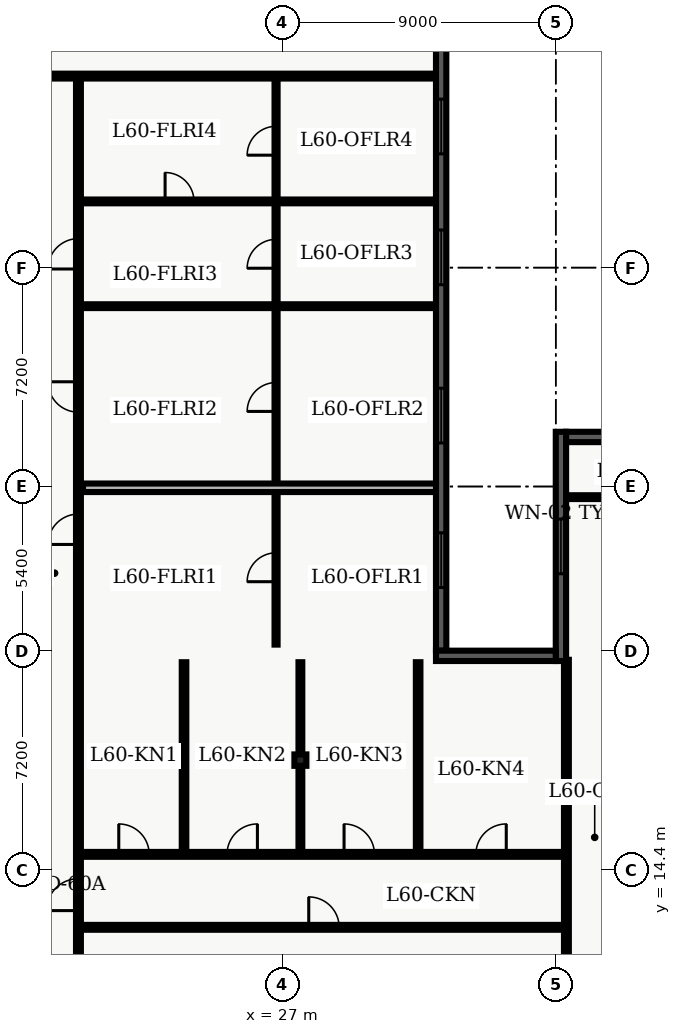
"""IFC4 building model, lengths in metres.
Left out: names, types, materials, properties, quantities, classifications, styles, units other than length and angle.
Written with IfcOpenShell. Run it as: python <this file> out.ifc"""

import sys

from ifc_helpers import new_model, entity, si_unit, converted_unit, direction, frame, origin_with_axes, origin_2d_with_axis, place, context, subcontext, project, spatial, polyline, rectangle, i_section, outline, extrude, element, fill, save


model = new_model("IFC4")
c1 = context("Model", 3, precision=1e-05, world=origin_with_axes(), true_north=direction((0.0, 1.0)))
c2 = subcontext(c1, "Body", "Model", "MODEL_VIEW")
j1 = project(units=[si_unit("LENGTHUNIT", "METRE"), converted_unit("PLANEANGLEUNIT", "DEGREE", entity("IfcPlaneAngleMeasure", 0.017), si_unit("PLANEANGLEUNIT", "RADIAN"), dimensions=[0, 0, 0, 0, 0, 0, 0])], contexts=[c1])
p1 = place(None, origin_with_axes())
s1 = spatial("IfcSite", under=j1, at=p1, CompositionType="ELEMENT")
p2 = place(p1, origin_with_axes())
s2 = spatial("IfcBuilding", under=s1, at=p2, CompositionType="ELEMENT")
p3 = place(p2, frame((0.0, 0.0, 244.2), z_axis=(0.0, 0.0, 1.0), x_axis=(1.0, 0.0, 0.0)))
s3 = spatial("IfcBuildingStorey", under=s2, at=p3, CompositionType="ELEMENT", Elevation=244.2)
p4 = place(p3, frame((27.6, 18.0, 0.0), z_axis=(0.0, 0.0, 1.0), x_axis=(1.0, 0.0, 0.0)))
e1 = element("IfcColumn", 1, at=p4, inside=s3, PredefinedType="COLUMN", context=c2, shape_type="SweptSolid", body=[
    extrude(i_section(OverallWidth=0.394, OverallDepth=0.375, WebThickness=0.017, FlangeThickness=0.028, FilletRadius=0.02, at=origin_2d_with_axis()), origin_with_axes(), (0.0, 0.0, 1.0), 3.9),
])
p5 = place(p3, frame((7.1, 40.5, 0.0), z_axis=(0.0, 0.0, 1.0), x_axis=(1.0, 0.0, 0.0)))
e2 = element("IfcWall", 2, at=p5, inside=s3, PredefinedType="PARTITIONING", context=c2, shape_type="SweptSolid", body=[
    extrude(outline(polyline([(0.0, -0.08), (24.965, -0.08), (24.965, 0.08), (0.0, 0.08), (0.0, -0.08)])), origin_with_axes(), (0.0, 0.0, 1.0), 2.64),
])
p6 = place(p5, frame((4.38, 0.0, 0.0), z_axis=(0.0, 0.0, 1.0), x_axis=(1.0, 0.0, 0.0)))
e3 = element("IfcOpeningElement", 3, at=p6, cuts=e2, PredefinedType="OPENING", context=c2, shape_type="SweptSolid", body=[
    extrude(rectangle(XDim=1.0, YDim=0.18, at=origin_2d_with_axis()), origin_with_axes(), (0.0, 0.0, 1.0), 2.15),
])
p7 = place(p5, frame((7.566, 0.0, 0.0), z_axis=(0.0, 0.0, 1.0), x_axis=(1.0, 0.0, 0.0)))
e4 = element("IfcOpeningElement", 4, at=p7, cuts=e2, PredefinedType="OPENING", context=c2, shape_type="SweptSolid", body=[
    extrude(rectangle(XDim=1.0, YDim=0.18, at=origin_2d_with_axis()), origin_with_axes(), (0.0, 0.0, 1.0), 2.15),
])
p8 = place(p5, frame((11.129, 0.0, 0.0), z_axis=(0.0, 0.0, 1.0), x_axis=(1.0, 0.0, 0.0)))
e5 = element("IfcOpeningElement", 5, at=p8, cuts=e2, PredefinedType="OPENING", context=c2, shape_type="SweptSolid", body=[
    extrude(rectangle(XDim=1.0, YDim=0.18, at=origin_2d_with_axis()), origin_with_axes(), (0.0, 0.0, 1.0), 2.15),
])
p9 = place(p3, frame((20.3, 7.8, 0.0), z_axis=(0.0, 0.0, 1.0), x_axis=(0.0, 1.0, 0.0)))
e6 = element("IfcWall", 6, at=p9, inside=s3, PredefinedType="PARTITIONING", context=c2, shape_type="SweptSolid", body=[
    extrude(outline(polyline([(0.0, -0.08), (32.7, -0.08), (32.7, 0.08), (0.0, 0.08), (0.0, -0.08)])), origin_with_axes(), (0.0, 0.0, 1.0), 2.64),
])
p10 = place(p9, frame((17.794, 0.0, 0.0), z_axis=(0.0, 0.0, 1.0), x_axis=(1.0, 0.0, 0.0)))
e7 = element("IfcOpeningElement", 7, at=p10, cuts=e6, PredefinedType="OPENING", context=c2, shape_type="SweptSolid", body=[
    extrude(rectangle(XDim=1.0, YDim=0.18, at=origin_2d_with_axis()), origin_with_axes(), (0.0, 0.0, 1.0), 2.15),
])
p11 = place(p9, frame((22.145, 0.0, 0.0), z_axis=(0.0, 0.0, 1.0), x_axis=(1.0, 0.0, 0.0)))
e8 = element("IfcOpeningElement", 8, at=p11, cuts=e6, PredefinedType="OPENING", context=c2, shape_type="SweptSolid", body=[
    extrude(rectangle(XDim=1.0, YDim=0.18, at=origin_2d_with_axis()), origin_with_axes(), (0.0, 0.0, 1.0), 2.15),
])
p12 = place(p9, frame((26.855, 0.0, 0.0), z_axis=(0.0, 0.0, 1.0), x_axis=(1.0, 0.0, 0.0)))
e9 = element("IfcOpeningElement", 9, at=p12, cuts=e6, PredefinedType="OPENING", context=c2, shape_type="SweptSolid", body=[
    extrude(rectangle(XDim=1.0, YDim=0.18, at=origin_2d_with_axis()), origin_with_axes(), (0.0, 0.0, 1.0), 2.15),
])
p13 = place(p9, frame((5.775, 0.0, 0.0), z_axis=(0.0, 0.0, 1.0), x_axis=(1.0, 0.0, 0.0)))
e10 = element("IfcOpeningElement", 10, at=p13, cuts=e6, PredefinedType="OPENING", context=c2, shape_type="SweptSolid", body=[
    extrude(rectangle(XDim=1.05, YDim=0.18, at=origin_2d_with_axis()), origin_with_axes(), (0.0, 0.0, 1.0), 2.15),
])
p14 = place(p3, frame((26.8, 21.8, 0.0), z_axis=(0.0, 0.0, 1.0), x_axis=(0.0, 1.0, 0.0)))
e11 = element("IfcWall", 11, at=p14, inside=s3, PredefinedType="PARTITIONING", context=c2, shape_type="SweptSolid", body=[
    extrude(outline(polyline([(0.0, -0.05), (18.5, -0.05), (18.5, 0.05), (0.0, 0.05), (0.0, -0.05)])), origin_with_axes(), (0.0, 0.0, 1.0), 2.64),
])
p15 = place(p14, frame((2.544, 0.0, 0.0), z_axis=(0.0, 0.0, 1.0), x_axis=(1.0, 0.0, 0.0)))
e12 = element("IfcOpeningElement", 12, at=p15, cuts=e11, PredefinedType="OPENING", context=c2, shape_type="SweptSolid", body=[
    extrude(rectangle(XDim=0.95, YDim=0.12, at=origin_2d_with_axis()), origin_with_axes(), (0.0, 0.0, 1.0), 2.15),
])
p16 = place(p14, frame((8.145, 0.0, 0.0), z_axis=(0.0, 0.0, 1.0), x_axis=(1.0, 0.0, 0.0)))
e13 = element("IfcOpeningElement", 13, at=p16, cuts=e11, PredefinedType="OPENING", context=c2, shape_type="SweptSolid", body=[
    extrude(rectangle(XDim=0.95, YDim=0.12, at=origin_2d_with_axis()), origin_with_axes(), (0.0, 0.0, 1.0), 2.15),
])
p17 = place(p14, frame((12.855, 0.0, 0.0), z_axis=(0.0, 0.0, 1.0), x_axis=(1.0, 0.0, 0.0)))
e14 = element("IfcOpeningElement", 14, at=p17, cuts=e11, PredefinedType="OPENING", context=c2, shape_type="SweptSolid", body=[
    extrude(rectangle(XDim=0.95, YDim=0.12, at=origin_2d_with_axis()), origin_with_axes(), (0.0, 0.0, 1.0), 2.15),
])
p18 = place(p14, frame((16.574, 0.0, 0.0), z_axis=(0.0, 0.0, 1.0), x_axis=(1.0, 0.0, 0.0)))
e15 = element("IfcOpeningElement", 15, at=p18, cuts=e11, PredefinedType="OPENING", context=c2, shape_type="SweptSolid", body=[
    extrude(rectangle(XDim=0.95, YDim=0.12, at=origin_2d_with_axis()), origin_with_axes(), (0.0, 0.0, 1.0), 2.15),
])
p19 = place(p3, frame((20.45, 26.958, 0.0), z_axis=(0.0, 0.0, 1.0), x_axis=(1.0, 0.0, 0.0)))
e16 = element("IfcWall", 16, at=p19, inside=s3, PredefinedType="PARTITIONING", context=c2, shape_type="SweptSolid", body=[
    extrude(outline(polyline([(0.0, -0.14), (11.615, -0.14), (11.615, 0.14), (0.0, 0.14), (0.0, -0.14)])), origin_with_axes(), (0.0, 0.0, 1.0), 2.64),
])
p20 = place(p3, frame((20.45, 32.932, 0.0), z_axis=(0.0, 0.0, 1.0), x_axis=(1.0, 0.0, 0.0)))
e17 = element("IfcWall", 17, at=p20, inside=s3, PredefinedType="PARTITIONING", context=c2, shape_type="SweptSolid", body=[
    extrude(outline(polyline([(0.0, -0.062), (11.615, -0.062), (11.615, 0.062), (0.0, 0.062), (0.0, -0.062)])), origin_with_axes(), (0.0, 0.0, 1.0), 2.64),
])
p21 = place(p3, frame((20.45, 36.378, 0.0), z_axis=(0.0, 0.0, 1.0), x_axis=(1.0, 0.0, 0.0)))
e18 = element("IfcWall", 18, at=p21, inside=s3, PredefinedType="PARTITIONING", context=c2, shape_type="SweptSolid", body=[
    extrude(outline(polyline([(0.0, -0.062), (11.615, -0.062), (11.615, 0.062), (0.0, 0.062), (0.0, -0.062)])), origin_with_axes(), (0.0, 0.0, 1.0), 2.64),
])
p22 = place(p21, frame((3.175, 0.0, 0.0), z_axis=(0.0, 0.0, 1.0), x_axis=(1.0, 0.0, 0.0)))
e19 = element("IfcOpeningElement", 19, at=p22, cuts=e18, PredefinedType="OPENING", context=c2, shape_type="SweptSolid", body=[
    extrude(rectangle(XDim=0.95, YDim=0.145, at=origin_2d_with_axis()), origin_with_axes(), (0.0, 0.0, 1.0), 2.15),
])
p23 = place(p3, frame((20.3, 12.5, 0.0), z_axis=(0.0, 0.0, 1.0), x_axis=(1.0, 0.0, 0.0)))
e20 = element("IfcWall", 20, at=p23, inside=s3, PredefinedType="PARTITIONING", context=c2, shape_type="SweptSolid", body=[
    extrude(outline(polyline([(0.0, -0.08), (16.05, -0.08), (16.05, 0.08), (0.0, 0.08), (0.0, -0.08)])), origin_with_axes(), (0.0, 0.0, 1.0), 2.64),
])
p24 = place(p23, frame((8.075, 0.0, 0.0), z_axis=(0.0, 0.0, 1.0), x_axis=(1.0, 0.0, 0.0)))
e21 = element("IfcOpeningElement", 21, at=p24, cuts=e20, PredefinedType="OPENING", context=c2, shape_type="SweptSolid", body=[
    extrude(rectangle(XDim=1.0, YDim=0.18, at=origin_2d_with_axis()), origin_with_axes(), (0.0, 0.0, 1.0), 2.15),
])
p25 = place(p3, frame((20.3, 14.9, 0.0), z_axis=(0.0, 0.0, 1.0), x_axis=(1.0, 0.0, 0.0)))
e22 = element("IfcWall", 22, at=p25, inside=s3, PredefinedType="PARTITIONING", context=c2, shape_type="SweptSolid", body=[
    extrude(outline(polyline([(0.0, -0.08), (16.05, -0.08), (16.05, 0.08), (0.0, 0.08), (0.0, -0.08)])), origin_with_axes(), (0.0, 0.0, 1.0), 2.64),
])
p26 = place(p25, frame((1.827, 0.0, 0.0), z_axis=(0.0, 0.0, 1.0), x_axis=(1.0, 0.0, 0.0)))
e23 = element("IfcOpeningElement", 23, at=p26, cuts=e22, PredefinedType="OPENING", context=c2, shape_type="SweptSolid", body=[
    extrude(rectangle(XDim=1.0, YDim=0.18, at=origin_2d_with_axis()), origin_with_axes(), (0.0, 0.0, 1.0), 2.15),
])
p27 = place(p25, frame((5.386, 0.0, 0.0), z_axis=(0.0, 0.0, 1.0), x_axis=(1.0, 0.0, 0.0)))
e24 = element("IfcOpeningElement", 24, at=p27, cuts=e22, PredefinedType="OPENING", context=c2, shape_type="SweptSolid", body=[
    extrude(rectangle(XDim=1.0, YDim=0.18, at=origin_2d_with_axis()), origin_with_axes(), (0.0, 0.0, 1.0), 2.15),
])
p28 = place(p25, frame((9.236, 0.0, 0.0), z_axis=(0.0, 0.0, 1.0), x_axis=(1.0, 0.0, 0.0)))
e25 = element("IfcOpeningElement", 25, at=p28, cuts=e22, PredefinedType="OPENING", context=c2, shape_type="SweptSolid", body=[
    extrude(rectangle(XDim=1.0, YDim=0.18, at=origin_2d_with_axis()), origin_with_axes(), (0.0, 0.0, 1.0), 2.15),
])
p29 = place(p25, frame((13.572, 0.0, 0.0), z_axis=(0.0, 0.0, 1.0), x_axis=(1.0, 0.0, 0.0)))
e26 = element("IfcOpeningElement", 26, at=p29, cuts=e22, PredefinedType="OPENING", context=c2, shape_type="SweptSolid", body=[
    extrude(rectangle(XDim=1.0, YDim=0.18, at=origin_2d_with_axis()), origin_with_axes(), (0.0, 0.0, 1.0), 2.15),
])
p30 = place(p3, frame((36.35, 4.35, 0.0), z_axis=(0.0, 0.0, 1.0), x_axis=(0.0, 1.0, 0.0)))
e27 = element("IfcWall", 27, at=p30, inside=s3, PredefinedType="PARTITIONING", context=c2, shape_type="SweptSolid", body=[
    extrude(outline(polyline([(0.0, -0.08), (16.95, -0.08), (16.95, 0.08), (0.0, 0.08), (0.0, -0.08)])), origin_with_axes(), (0.0, 0.0, 1.0), 2.64),
])
p31 = place(p3, frame((23.773, 15.02, 0.0), z_axis=(0.0, 0.0, 1.0), x_axis=(0.0, 1.0, 0.0)))
e28 = element("IfcWall", 28, at=p31, inside=s3, PredefinedType="PARTITIONING", context=c2, shape_type="SweptSolid", body=[
    extrude(outline(polyline([(0.0, -0.075), (6.2, -0.075), (6.2, 0.075), (0.0, 0.075), (0.0, -0.075)])), origin_with_axes(), (0.0, 0.0, 1.0), 2.64),
])
p32 = place(p3, frame((27.6, 15.02, 0.0), z_axis=(0.0, 0.0, 1.0), x_axis=(0.0, 1.0, 0.0)))
e29 = element("IfcWall", 29, at=p32, inside=s3, PredefinedType="PARTITIONING", context=c2, shape_type="SweptSolid", body=[
    extrude(outline(polyline([(0.0, -0.062), (6.2, -0.062), (6.2, 0.062), (0.0, 0.062), (0.0, -0.062)])), origin_with_axes(), (0.0, 0.0, 1.0), 2.64),
])
p33 = place(p3, frame((31.473, 15.02, 0.0), z_axis=(0.0, 0.0, 1.0), x_axis=(0.0, 1.0, 0.0)))
e30 = element("IfcWall", 30, at=p33, inside=s3, PredefinedType="PARTITIONING", context=c2, shape_type="SweptSolid", body=[
    extrude(outline(polyline([(0.0, -0.075), (6.2, -0.075), (6.2, 0.075), (0.0, 0.075), (0.0, -0.075)])), origin_with_axes(), (0.0, 0.0, 1.0), 2.64),
])
p34 = place(p3, frame((36.335, 26.65, 0.0), z_axis=(0.0, 0.0, 1.0), x_axis=(1.0, 0.0, 0.0)))
e31 = element("IfcWall", 31, at=p34, inside=s3, PredefinedType="PARTITIONING", context=c2, shape_type="SweptSolid", body=[
    extrude(outline(polyline([(0.0, -0.062), (11.195, -0.062), (11.195, 0.062), (0.0, 0.062), (0.0, -0.062)])), origin_with_axes(), (0.0, 0.0, 1.0), 2.64),
])
p35 = place(p34, frame((6.665, 0.0, 0.0), z_axis=(0.0, 0.0, 1.0), x_axis=(1.0, 0.0, 0.0)))
e32 = element("IfcOpeningElement", 32, at=p35, cuts=e31, PredefinedType="OPENING", context=c2, shape_type="SweptSolid", body=[
    extrude(rectangle(XDim=1.0, YDim=0.145, at=origin_2d_with_axis()), origin_with_axes(), (0.0, 0.0, 1.0), 2.15),
])
p36 = place(p3, frame((36.17, 21.26, 0.0), z_axis=(0.0, 0.0, 1.0), x_axis=(0.0, 1.0, 0.0)))
e33 = element("IfcWall", 33, at=p36, inside=s3, PredefinedType="SOLIDWALL", context=c2, shape_type="SweptSolid", body=[
    extrude(outline(polyline([(0.0, -0.17), (7.54, -0.17), (7.54, 0.17), (0.0, 0.17), (0.0, -0.17)])), origin_with_axes(), (0.0, 0.0, 1.0), 3.6),
])
p37 = place(p36, frame((3.77, 0.0, 0.45), z_axis=(0.0, 0.0, 1.0), x_axis=(1.0, 0.0, 0.0)))
e34 = element("IfcOpeningElement", 34, at=p37, cuts=e33, PredefinedType="OPENING", context=c2, shape_type="SweptSolid", body=[
    extrude(rectangle(XDim=1.8, YDim=0.36, at=origin_2d_with_axis()), origin_with_axes(), (0.0, 0.0, 1.0), 2.1),
])
p38 = place(p3, frame((36.34, 28.63, 0.0), z_axis=(0.0, 0.0, 1.0), x_axis=(1.0, 0.0, 0.0)))
e35 = element("IfcWall", 35, at=p38, inside=s3, PredefinedType="SOLIDWALL", context=c2, shape_type="SweptSolid", body=[
    extrude(outline(polyline([(0.0, -0.17), (13.46, -0.17), (13.46, 0.17), (0.0, 0.17), (0.0, -0.17)])), origin_with_axes(), (0.0, 0.0, 1.0), 3.6),
])
p39 = place(p38, frame((3.665, 0.0, 0.45), z_axis=(0.0, 0.0, 1.0), x_axis=(1.0, 0.0, 0.0)))
e36 = element("IfcOpeningElement", 36, at=p39, cuts=e35, PredefinedType="OPENING", context=c2, shape_type="SweptSolid", body=[
    extrude(rectangle(XDim=1.8, YDim=0.36, at=origin_2d_with_axis()), origin_with_axes(), (0.0, 0.0, 1.0), 2.1),
])
p40 = place(p38, frame((9.795, 0.0, 0.45), z_axis=(0.0, 0.0, 1.0), x_axis=(1.0, 0.0, 0.0)))
e37 = element("IfcOpeningElement", 37, at=p40, cuts=e35, PredefinedType="OPENING", context=c2, shape_type="SweptSolid", body=[
    extrude(rectangle(XDim=1.8, YDim=0.36, at=origin_2d_with_axis()), origin_with_axes(), (0.0, 0.0, 1.0), 2.1),
])
p41 = place(p3, frame((32.23, 41.82, 0.0), z_axis=(0.0, 0.0, 1.0), x_axis=(0.0, -1.0, 0.0)))
e38 = element("IfcWall", 38, at=p41, inside=s3, PredefinedType="SOLIDWALL", context=c2, shape_type="SweptSolid", body=[
    extrude(outline(polyline([(0.0, -0.17), (20.22, -0.17), (20.22, 0.17), (0.0, 0.17), (0.0, -0.17)])), origin_with_axes(), (0.0, 0.0, 1.0), 3.6),
])
p42 = place(p41, frame((2.978, 0.0, 0.45), z_axis=(0.0, 0.0, 1.0), x_axis=(1.0, 0.0, 0.0)))
e39 = element("IfcOpeningElement", 39, at=p42, cuts=e38, PredefinedType="OPENING", context=c2, shape_type="SweptSolid", body=[
    extrude(rectangle(XDim=1.8, YDim=0.36, at=origin_2d_with_axis()), origin_with_axes(), (0.0, 0.0, 1.0), 2.1),
])
p43 = place(p41, frame((7.282, 0.0, 0.45), z_axis=(0.0, 0.0, 1.0), x_axis=(1.0, 0.0, 0.0)))
e40 = element("IfcOpeningElement", 40, at=p43, cuts=e38, PredefinedType="OPENING", context=c2, shape_type="SweptSolid", body=[
    extrude(rectangle(XDim=1.8, YDim=0.36, at=origin_2d_with_axis()), origin_with_axes(), (0.0, 0.0, 1.0), 2.1),
])
p44 = place(p41, frame((12.487, 0.0, 0.45), z_axis=(0.0, 0.0, 1.0), x_axis=(1.0, 0.0, 0.0)))
e41 = element("IfcOpeningElement", 41, at=p44, cuts=e38, PredefinedType="OPENING", context=c2, shape_type="SweptSolid", body=[
    extrude(rectangle(XDim=1.8, YDim=0.36, at=origin_2d_with_axis()), origin_with_axes(), (0.0, 0.0, 1.0), 2.1),
])
p45 = place(p41, frame((17.243, 0.0, 0.45), z_axis=(0.0, 0.0, 1.0), x_axis=(1.0, 0.0, 0.0)))
e42 = element("IfcOpeningElement", 42, at=p45, cuts=e38, PredefinedType="OPENING", context=c2, shape_type="SweptSolid", body=[
    extrude(rectangle(XDim=1.8, YDim=0.36, at=origin_2d_with_axis()), origin_with_axes(), (0.0, 0.0, 1.0), 2.1),
])
p46 = place(p3, frame((32.06, 21.43, 0.0), z_axis=(0.0, 0.0, 1.0), x_axis=(1.0, 0.0, 0.0)))
e43 = element("IfcWall", 43, at=p46, inside=s3, PredefinedType="SOLIDWALL", context=c2, shape_type="SweptSolid", body=[
    extrude(outline(polyline([(0.0, -0.17), (3.94, -0.17), (3.94, 0.17), (0.0, 0.17), (0.0, -0.17)])), origin_with_axes(), (0.0, 0.0, 1.0), 3.6),
])
p47 = place(p14, frame((2.544, 0.0, 0.0), z_axis=(0.0, 0.0, 1.0), x_axis=(1.0, 0.0, 0.0)))
e44 = element("IfcDoor", 44, at=p47, inside=s3, OperationType="SINGLE_SWING_LEFT", PredefinedType="DOOR", context=c2, shape_type="SweptSolid", body=[
    extrude(rectangle(XDim=0.95, YDim=0.06, at=origin_2d_with_axis()), origin_with_axes(), (0.0, 0.0, 1.0), 2.15),
])
fill(e12, e44)
p48 = place(p9, frame((17.794, 0.0, 0.0), z_axis=(0.0, 0.0, 1.0), x_axis=(1.0, 0.0, 0.0)))
e45 = element("IfcDoor", 45, at=p48, inside=s3, OperationType="SINGLE_SWING_LEFT", PredefinedType="DOOR", context=c2, shape_type="SweptSolid", body=[
    extrude(rectangle(XDim=1.0, YDim=0.09, at=origin_2d_with_axis()), origin_with_axes(), (0.0, 0.0, 1.0), 2.15),
])
fill(e7, e45)
p49 = place(p14, frame((8.145, 0.0, 0.0), z_axis=(0.0, 0.0, 1.0), x_axis=(1.0, 0.0, 0.0)))
e46 = element("IfcDoor", 46, at=p49, inside=s3, OperationType="SINGLE_SWING_LEFT", PredefinedType="DOOR", context=c2, shape_type="SweptSolid", body=[
    extrude(rectangle(XDim=0.95, YDim=0.06, at=origin_2d_with_axis()), origin_with_axes(), (0.0, 0.0, 1.0), 2.15),
])
fill(e13, e46)
p50 = place(p9, frame((22.145, 0.0, 0.0), z_axis=(0.0, 0.0, 1.0), x_axis=(1.0, 0.0, 0.0)))
e47 = element("IfcDoor", 47, at=p50, inside=s3, OperationType="SINGLE_SWING_RIGHT", PredefinedType="DOOR", context=c2, shape_type="SweptSolid", body=[
    extrude(rectangle(XDim=1.0, YDim=0.09, at=origin_2d_with_axis()), origin_with_axes(), (0.0, 0.0, 1.0), 2.15),
])
fill(e8, e47)
p51 = place(p14, frame((12.855, 0.0, 0.0), z_axis=(0.0, 0.0, 1.0), x_axis=(1.0, 0.0, 0.0)))
e48 = element("IfcDoor", 48, at=p51, inside=s3, OperationType="SINGLE_SWING_LEFT", PredefinedType="DOOR", context=c2, shape_type="SweptSolid", body=[
    extrude(rectangle(XDim=0.95, YDim=0.06, at=origin_2d_with_axis()), origin_with_axes(), (0.0, 0.0, 1.0), 2.15),
])
fill(e14, e48)
p52 = place(p9, frame((26.855, 0.0, 0.0), z_axis=(0.0, 0.0, 1.0), x_axis=(1.0, 0.0, 0.0)))
e49 = element("IfcDoor", 49, at=p52, inside=s3, OperationType="SINGLE_SWING_LEFT", PredefinedType="DOOR", context=c2, shape_type="SweptSolid", body=[
    extrude(rectangle(XDim=1.0, YDim=0.09, at=origin_2d_with_axis()), origin_with_axes(), (0.0, 0.0, 1.0), 2.15),
])
fill(e9, e49)
p53 = place(p14, frame((16.574, 0.0, 0.0), z_axis=(0.0, 0.0, 1.0), x_axis=(1.0, 0.0, 0.0)))
e50 = element("IfcDoor", 50, at=p53, inside=s3, OperationType="SINGLE_SWING_LEFT", PredefinedType="DOOR", context=c2, shape_type="SweptSolid", body=[
    extrude(rectangle(XDim=0.95, YDim=0.06, at=origin_2d_with_axis()), origin_with_axes(), (0.0, 0.0, 1.0), 2.15),
])
fill(e15, e50)
p54 = place(p21, frame((3.175, 0.0, 0.0), z_axis=(0.0, 0.0, 1.0), x_axis=(1.0, 0.0, 0.0)))
e51 = element("IfcDoor", 51, at=p54, inside=s3, OperationType="SINGLE_SWING_LEFT", PredefinedType="DOOR", context=c2, shape_type="SweptSolid", body=[
    extrude(rectangle(XDim=0.95, YDim=0.075, at=origin_2d_with_axis()), origin_with_axes(), (0.0, 0.0, 1.0), 2.15),
])
fill(e19, e51)
p55 = place(p9, frame((5.775, 0.0, 0.0), z_axis=(0.0, 0.0, 1.0), x_axis=(1.0, 0.0, 0.0)))
e52 = element("IfcDoor", 52, at=p55, inside=s3, OperationType="SINGLE_SWING_LEFT", PredefinedType="DOOR", context=c2, shape_type="SweptSolid", body=[
    extrude(rectangle(XDim=1.05, YDim=0.09, at=origin_2d_with_axis()), origin_with_axes(), (0.0, 0.0, 1.0), 2.15),
])
fill(e10, e52)
p56 = place(p23, frame((8.075, 0.0, 0.0), z_axis=(0.0, 0.0, 1.0), x_axis=(1.0, 0.0, 0.0)))
e53 = element("IfcDoor", 53, at=p56, inside=s3, OperationType="SINGLE_SWING_LEFT", PredefinedType="DOOR", context=c2, shape_type="SweptSolid", body=[
    extrude(rectangle(XDim=1.0, YDim=0.09, at=origin_2d_with_axis()), origin_with_axes(), (0.0, 0.0, 1.0), 2.15),
])
fill(e21, e53)
p57 = place(p25, frame((1.827, 0.0, 0.0), z_axis=(0.0, 0.0, 1.0), x_axis=(1.0, 0.0, 0.0)))
e54 = element("IfcDoor", 54, at=p57, inside=s3, OperationType="SINGLE_SWING_LEFT", PredefinedType="DOOR", context=c2, shape_type="SweptSolid", body=[
    extrude(rectangle(XDim=1.0, YDim=0.09, at=origin_2d_with_axis()), origin_with_axes(), (0.0, 0.0, 1.0), 2.15),
])
fill(e23, e54)
p58 = place(p25, frame((5.386, 0.0, 0.0), z_axis=(0.0, 0.0, 1.0), x_axis=(1.0, 0.0, 0.0)))
e55 = element("IfcDoor", 55, at=p58, inside=s3, OperationType="SINGLE_SWING_RIGHT", PredefinedType="DOOR", context=c2, shape_type="SweptSolid", body=[
    extrude(rectangle(XDim=1.0, YDim=0.09, at=origin_2d_with_axis()), origin_with_axes(), (0.0, 0.0, 1.0), 2.15),
])
fill(e24, e55)
p59 = place(p25, frame((9.236, 0.0, 0.0), z_axis=(0.0, 0.0, 1.0), x_axis=(1.0, 0.0, 0.0)))
e56 = element("IfcDoor", 56, at=p59, inside=s3, OperationType="SINGLE_SWING_LEFT", PredefinedType="DOOR", context=c2, shape_type="SweptSolid", body=[
    extrude(rectangle(XDim=1.0, YDim=0.09, at=origin_2d_with_axis()), origin_with_axes(), (0.0, 0.0, 1.0), 2.15),
])
fill(e25, e56)
p60 = place(p25, frame((13.572, 0.0, 0.0), z_axis=(0.0, 0.0, 1.0), x_axis=(1.0, 0.0, 0.0)))
e57 = element("IfcDoor", 57, at=p60, inside=s3, OperationType="SINGLE_SWING_RIGHT", PredefinedType="DOOR", context=c2, shape_type="SweptSolid", body=[
    extrude(rectangle(XDim=1.0, YDim=0.09, at=origin_2d_with_axis()), origin_with_axes(), (0.0, 0.0, 1.0), 2.15),
])
fill(e26, e57)
p61 = place(p36, frame((3.77, 0.0, 0.45), z_axis=(0.0, 0.0, 1.0), x_axis=(1.0, 0.0, 0.0)))
e58 = element("IfcWindow", 58, at=p61, inside=s3, PredefinedType="WINDOW", context=c2, shape_type="SweptSolid", body=[
    extrude(rectangle(XDim=1.8, YDim=0.09, at=origin_2d_with_axis()), origin_with_axes(), (0.0, 0.0, 1.0), 2.1),
])
fill(e34, e58)
p62 = place(p41, frame((2.978, 0.0, 0.45), z_axis=(0.0, 0.0, 1.0), x_axis=(1.0, 0.0, 0.0)))
e59 = element("IfcWindow", 59, at=p62, inside=s3, PredefinedType="WINDOW", context=c2, shape_type="SweptSolid", body=[
    extrude(rectangle(XDim=1.8, YDim=0.09, at=origin_2d_with_axis()), origin_with_axes(), (0.0, 0.0, 1.0), 2.1),
])
fill(e39, e59)
p63 = place(p41, frame((7.282, 0.0, 0.45), z_axis=(0.0, 0.0, 1.0), x_axis=(1.0, 0.0, 0.0)))
e60 = element("IfcWindow", 60, at=p63, inside=s3, PredefinedType="WINDOW", context=c2, shape_type="SweptSolid", body=[
    extrude(rectangle(XDim=1.8, YDim=0.09, at=origin_2d_with_axis()), origin_with_axes(), (0.0, 0.0, 1.0), 2.1),
])
fill(e40, e60)
p64 = place(p41, frame((12.487, 0.0, 0.45), z_axis=(0.0, 0.0, 1.0), x_axis=(1.0, 0.0, 0.0)))
e61 = element("IfcWindow", 61, at=p64, inside=s3, PredefinedType="WINDOW", context=c2, shape_type="SweptSolid", body=[
    extrude(rectangle(XDim=1.8, YDim=0.09, at=origin_2d_with_axis()), origin_with_axes(), (0.0, 0.0, 1.0), 2.1),
])
fill(e41, e61)
p65 = place(p41, frame((17.243, 0.0, 0.45), z_axis=(0.0, 0.0, 1.0), x_axis=(1.0, 0.0, 0.0)))
e62 = element("IfcWindow", 62, at=p65, inside=s3, PredefinedType="WINDOW", context=c2, shape_type="SweptSolid", body=[
    extrude(rectangle(XDim=1.8, YDim=0.09, at=origin_2d_with_axis()), origin_with_axes(), (0.0, 0.0, 1.0), 2.1),
])
fill(e42, e62)
save(model, sys.argv[1])
